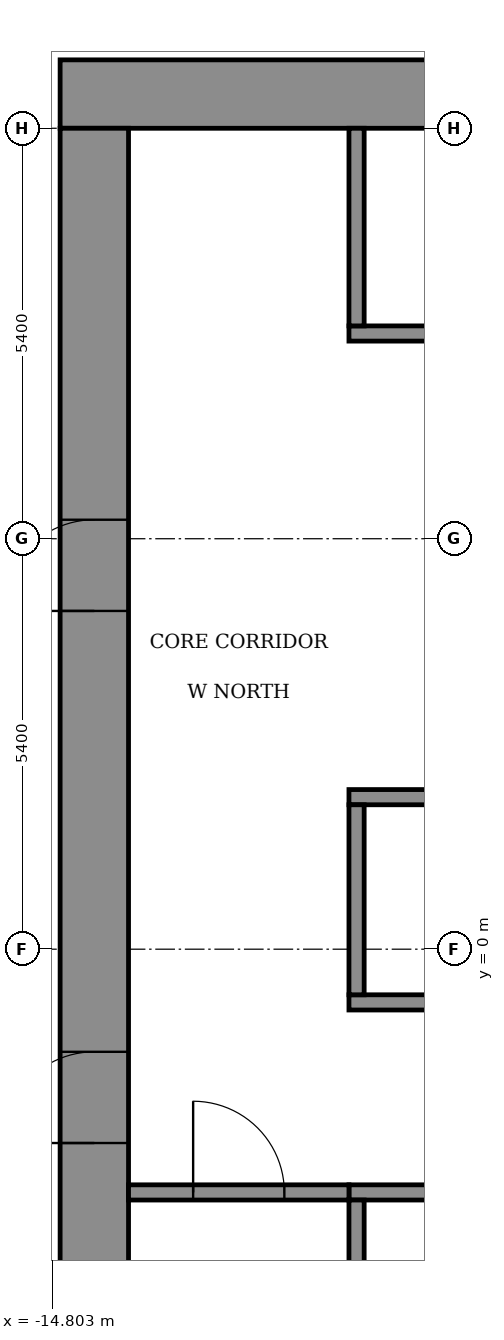
"""IFC4 building model, lengths in metres.
Left out: names, types, materials, properties, quantities, classifications, styles, units other than length and angle.
Written with IfcOpenShell. Run it as: python <this file> out.ifc"""

import sys

from ifc_helpers import new_model, si_unit, direction, frame, frame_2d, origin, place, context, subcontext, project, spatial, rectangle, extrude, element, fill, save


model = new_model("IFC4")
c1 = context("Model", 3, precision=1e-05, world=origin(), true_north=direction((0.0, 1.0)))
c2 = subcontext(c1, "Body", "Model", "MODEL_VIEW")
j1 = project(units=[si_unit("LENGTHUNIT", "METRE"), si_unit("PLANEANGLEUNIT", "RADIAN")], contexts=[c1])
p1 = place(None, origin())
s1 = spatial("IfcSite", under=j1, at=p1, CompositionType="ELEMENT")
p2 = place(p1, origin())
s2 = spatial("IfcBuilding", under=s1, at=p2, CompositionType="ELEMENT")
p3 = place(p2, frame((0.0, 0.0, 186.1)))
s3 = spatial("IfcBuildingStorey", under=s2, at=p3, CompositionType="ELEMENT", Elevation=186.1)
p4 = place(p3, frame((-14.7, 11.25, 0.0), z_axis=(0.0, 0.0, 1.0), x_axis=(1.0, 0.0, 0.0)))
e1 = element("IfcWall", 1, at=p4, inside=s3, PredefinedType="SHEAR", context=c2, shape_type="SweptSolid", body=[
    extrude(rectangle(XDim=29.4, YDim=0.9, at=frame_2d((14.7, 0.0))), origin(), (0.0, 0.0, 1.0), 3.6),
])
p5 = place(p3, frame((-14.25, -10.8, 0.0), z_axis=(0.0, 0.0, 1.0), x_axis=(0.0, 1.0, 0.0)))
e2 = element("IfcWall", 2, at=p5, inside=s3, PredefinedType="SHEAR", context=c2, shape_type="SweptSolid", body=[
    extrude(rectangle(XDim=21.6, YDim=0.9, at=frame_2d((10.8, 0.0))), origin(), (0.0, 0.0, 1.0), 3.6),
])
p6 = place(p5, frame((8.25, 0.0, 0.0)))
e3 = element("IfcOpeningElement", 3, at=p6, cuts=e2, PredefinedType="OPENING", context=c2, shape_type="SweptSolid", body=[
    extrude(rectangle(XDim=1.2, YDim=2.1, at=frame_2d((0.6, 1.05))), frame((0.0, 0.46, 0.0), z_axis=(0.0, -1.0, 0.0), x_axis=(1.0, 0.0, 0.0)), (0.0, 0.0, 1.0), 0.92),
])
p7 = place(p5, frame((15.25, 0.0, 0.0)))
e4 = element("IfcOpeningElement", 4, at=p7, cuts=e2, PredefinedType="OPENING", context=c2, shape_type="SweptSolid", body=[
    extrude(rectangle(XDim=1.2, YDim=2.1, at=frame_2d((0.6, 1.05))), frame((0.0, 0.46, 0.0), z_axis=(0.0, -1.0, 0.0), x_axis=(1.0, 0.0, 0.0)), (0.0, 0.0, 1.0), 0.92),
])
p8 = place(p3, frame((-10.9, -3.2, 0.0), z_axis=(0.0, 0.0, 1.0), x_axis=(1.0, 0.0, 0.0)))
e5 = element("IfcWall", 5, at=p8, inside=s3, PredefinedType="SHEAR", context=c2, shape_type="SweptSolid", body=[
    extrude(rectangle(XDim=21.8, YDim=0.2, at=frame_2d((10.9, 0.0))), origin(), (0.0, 0.0, 1.0), 3.05),
])
p9 = place(p8, frame((1.075, 0.0, 0.0)))
e6 = element("IfcOpeningElement", 6, at=p9, cuts=e5, PredefinedType="OPENING", context=c2, shape_type="SweptSolid", body=[
    extrude(rectangle(XDim=1.1, YDim=2.1, at=frame_2d((0.55, 1.05))), frame((0.0, 0.11, 0.0), z_axis=(0.0, -1.0, 0.0), x_axis=(1.0, 0.0, 0.0)), (0.0, 0.0, 1.0), 0.22),
])
p10 = place(p8, frame((10.325, 0.0, 0.0)))
e7 = element("IfcOpeningElement", 7, at=p10, cuts=e5, PredefinedType="OPENING", context=c2, shape_type="SweptSolid", body=[
    extrude(rectangle(XDim=1.1, YDim=2.1, at=frame_2d((0.55, 1.05))), frame((0.0, 0.11, 0.0), z_axis=(0.0, -1.0, 0.0), x_axis=(1.0, 0.0, 0.0)), (0.0, 0.0, 1.0), 0.22),
])
p11 = place(p8, frame((19.625, 0.0, 0.0)))
e8 = element("IfcOpeningElement", 8, at=p11, cuts=e5, PredefinedType="OPENING", context=c2, shape_type="SweptSolid", body=[
    extrude(rectangle(XDim=1.1, YDim=2.1, at=frame_2d((0.55, 1.05))), frame((0.0, 0.11, 0.0), z_axis=(0.0, -1.0, 0.0), x_axis=(1.0, 0.0, 0.0)), (0.0, 0.0, 1.0), 0.22),
])
p12 = place(p8, frame((5.7, 0.0, 0.0)))
e9 = element("IfcOpeningElement", 9, at=p12, cuts=e5, PredefinedType="OPENING", context=c2, shape_type="SweptSolid", body=[
    extrude(rectangle(XDim=1.1, YDim=2.1, at=frame_2d((0.55, 1.05))), frame((0.0, 0.11, 0.0), z_axis=(0.0, -1.0, 0.0), x_axis=(1.0, 0.0, 0.0)), (0.0, 0.0, 1.0), 0.22),
])
p13 = place(p8, frame((14.975, 0.0, 0.0)))
e10 = element("IfcOpeningElement", 10, at=p13, cuts=e5, PredefinedType="OPENING", context=c2, shape_type="SweptSolid", body=[
    extrude(rectangle(XDim=1.1, YDim=2.1, at=frame_2d((0.55, 1.05))), frame((0.0, 0.11, 0.0), z_axis=(0.0, -1.0, 0.0), x_axis=(1.0, 0.0, 0.0)), (0.0, 0.0, 1.0), 0.22),
])
p14 = place(p3, frame((-10.9, -0.7, 0.0), z_axis=(0.0, 0.0, 1.0), x_axis=(1.0, 0.0, 0.0)))
e11 = element("IfcWall", 11, at=p14, inside=s3, PredefinedType="SHEAR", context=c2, shape_type="SweptSolid", body=[
    extrude(rectangle(XDim=21.8, YDim=0.2, at=frame_2d((10.9, 0.0))), origin(), (0.0, 0.0, 1.0), 3.05),
])
p15 = place(p3, frame((-10.9, 2.0, 0.0), z_axis=(0.0, 0.0, 1.0), x_axis=(1.0, 0.0, 0.0)))
e12 = element("IfcWall", 12, at=p15, inside=s3, PredefinedType="SHEAR", context=c2, shape_type="SweptSolid", body=[
    extrude(rectangle(XDim=21.8, YDim=0.2, at=frame_2d((10.9, 0.0))), origin(), (0.0, 0.0, 1.0), 3.05),
])
p16 = place(p15, frame((14.4, 0.0, 0.0)))
e13 = element("IfcOpeningElement", 13, at=p16, cuts=e12, PredefinedType="OPENING", context=c2, shape_type="SweptSolid", body=[
    extrude(rectangle(XDim=1.1, YDim=2.1, at=frame_2d((0.55, 1.05))), frame((0.0, 0.11, 0.0), z_axis=(0.0, -1.0, 0.0), x_axis=(1.0, 0.0, 0.0)), (0.0, 0.0, 1.0), 0.22),
])
p17 = place(p15, frame((17.1, 0.0, 0.0)))
e14 = element("IfcOpeningElement", 14, at=p17, cuts=e12, PredefinedType="OPENING", context=c2, shape_type="SweptSolid", body=[
    extrude(rectangle(XDim=1.1, YDim=2.1, at=frame_2d((0.55, 1.05))), frame((0.0, 0.11, 0.0), z_axis=(0.0, -1.0, 0.0), x_axis=(1.0, 0.0, 0.0)), (0.0, 0.0, 1.0), 0.22),
])
p18 = place(p15, frame((19.8, 0.0, 0.0)))
e15 = element("IfcOpeningElement", 15, at=p18, cuts=e12, PredefinedType="OPENING", context=c2, shape_type="SweptSolid", body=[
    extrude(rectangle(XDim=1.1, YDim=2.1, at=frame_2d((0.55, 1.05))), frame((0.0, 0.11, 0.0), z_axis=(0.0, -1.0, 0.0), x_axis=(1.0, 0.0, 0.0)), (0.0, 0.0, 1.0), 0.22),
])
p19 = place(p15, frame((3.025, 0.0, 0.0)))
e16 = element("IfcOpeningElement", 16, at=p19, cuts=e12, PredefinedType="OPENING", context=c2, shape_type="SweptSolid", body=[
    extrude(rectangle(XDim=0.9, YDim=2.1, at=frame_2d((0.45, 1.05))), frame((0.0, 0.11, 0.0), z_axis=(0.0, -1.0, 0.0), x_axis=(1.0, 0.0, 0.0)), (0.0, 0.0, 1.0), 0.22),
])
p20 = place(p15, frame((9.775, 0.0, 0.0)))
e17 = element("IfcOpeningElement", 17, at=p20, cuts=e12, PredefinedType="OPENING", context=c2, shape_type="SweptSolid", body=[
    extrude(rectangle(XDim=0.9, YDim=2.1, at=frame_2d((0.45, 1.05))), frame((0.0, 0.11, 0.0), z_axis=(0.0, -1.0, 0.0), x_axis=(1.0, 0.0, 0.0)), (0.0, 0.0, 1.0), 0.22),
])
p21 = place(p3, frame((-10.9, 8.1, 0.0), z_axis=(0.0, 0.0, 1.0), x_axis=(1.0, 0.0, 0.0)))
e18 = element("IfcWall", 18, at=p21, inside=s3, PredefinedType="SHEAR", context=c2, shape_type="SweptSolid", body=[
    extrude(rectangle(XDim=21.8, YDim=0.2, at=frame_2d((10.9, 0.0))), origin(), (0.0, 0.0, 1.0), 3.05),
])
p22 = place(p21, frame((14.4, 0.0, 0.0)))
e19 = element("IfcOpeningElement", 19, at=p22, cuts=e18, PredefinedType="OPENING", context=c2, shape_type="SweptSolid", body=[
    extrude(rectangle(XDim=1.1, YDim=2.1, at=frame_2d((0.55, 1.05))), frame((0.0, 0.11, 0.0), z_axis=(0.0, -1.0, 0.0), x_axis=(1.0, 0.0, 0.0)), (0.0, 0.0, 1.0), 0.22),
])
p23 = place(p21, frame((17.1, 0.0, 0.0)))
e20 = element("IfcOpeningElement", 20, at=p23, cuts=e18, PredefinedType="OPENING", context=c2, shape_type="SweptSolid", body=[
    extrude(rectangle(XDim=1.1, YDim=2.1, at=frame_2d((0.55, 1.05))), frame((0.0, 0.11, 0.0), z_axis=(0.0, -1.0, 0.0), x_axis=(1.0, 0.0, 0.0)), (0.0, 0.0, 1.0), 0.22),
])
p24 = place(p21, frame((19.8, 0.0, 0.0)))
e21 = element("IfcOpeningElement", 21, at=p24, cuts=e18, PredefinedType="OPENING", context=c2, shape_type="SweptSolid", body=[
    extrude(rectangle(XDim=1.1, YDim=2.1, at=frame_2d((0.55, 1.05))), frame((0.0, 0.11, 0.0), z_axis=(0.0, -1.0, 0.0), x_axis=(1.0, 0.0, 0.0)), (0.0, 0.0, 1.0), 0.22),
])
p25 = place(p21, frame((6.4, 0.0, 0.0)))
e22 = element("IfcOpeningElement", 22, at=p25, cuts=e18, PredefinedType="OPENING", context=c2, shape_type="SweptSolid", body=[
    extrude(rectangle(XDim=0.9, YDim=2.1, at=frame_2d((0.45, 1.05))), frame((0.0, 0.11, 0.0), z_axis=(0.0, -1.0, 0.0), x_axis=(1.0, 0.0, 0.0)), (0.0, 0.0, 1.0), 0.22),
])
p26 = place(p3, frame((-10.8, -10.8, 0.0), z_axis=(0.0, 0.0, 1.0), x_axis=(0.0, 1.0, 0.0)))
e23 = element("IfcWall", 23, at=p26, inside=s3, PredefinedType="SHEAR", context=c2, shape_type="SweptSolid", body=[
    extrude(rectangle(XDim=7.5, YDim=0.2, at=frame_2d((3.75, 0.0))), origin(), (0.0, 0.0, 1.0), 3.05),
])
p27 = place(p3, frame((-10.8, -0.6, 0.0), z_axis=(0.0, 0.0, 1.0), x_axis=(0.0, 1.0, 0.0)))
e24 = element("IfcWall", 24, at=p27, inside=s3, PredefinedType="STANDARD", context=c2, shape_type="SweptSolid", body=[
    extrude(rectangle(XDim=2.5, YDim=0.2, at=frame_2d((1.25, 0.0))), origin(), (0.0, 0.0, 1.0), 3.05),
])
p28 = place(p3, frame((-10.8, 8.2, 0.0), z_axis=(0.0, 0.0, 1.0), x_axis=(0.0, 1.0, 0.0)))
e25 = element("IfcWall", 25, at=p28, inside=s3, PredefinedType="STANDARD", context=c2, shape_type="SweptSolid", body=[
    extrude(rectangle(XDim=2.6, YDim=0.2, at=frame_2d((1.3, 0.0))), origin(), (0.0, 0.0, 1.0), 3.05),
])
p29 = place(p3, frame((-13.8, -3.2, 0.0), z_axis=(0.0, 0.0, 1.0), x_axis=(1.0, 0.0, 0.0)))
e26 = element("IfcWall", 26, at=p29, inside=s3, PredefinedType="STANDARD", context=c2, shape_type="SweptSolid", body=[
    extrude(rectangle(XDim=2.9, YDim=0.2, at=frame_2d((1.45, 0.0))), origin(), (0.0, 0.0, 1.0), 3.05),
])
p30 = place(p29, frame((0.85, 0.0, 0.0)))
e27 = element("IfcOpeningElement", 27, at=p30, cuts=e26, PredefinedType="OPENING", context=c2, shape_type="SweptSolid", body=[
    extrude(rectangle(XDim=1.2, YDim=2.1, at=frame_2d((0.6, 1.05))), frame((0.0, 0.11, 0.0), z_axis=(0.0, -1.0, 0.0), x_axis=(1.0, 0.0, 0.0)), (0.0, 0.0, 1.0), 0.22),
])
p31 = place(p6, origin())
e28 = element("IfcDoor", 28, at=p31, inside=s3, OperationType="DOUBLE_DOOR_SINGLE_SWING", PredefinedType="DOOR", context=c2, shape_type="SweptSolid", body=[
    extrude(rectangle(XDim=1.2, YDim=2.1, at=frame_2d((0.6, 1.05))), frame((0.0, 0.025, 0.0), z_axis=(0.0, -1.0, 0.0), x_axis=(1.0, 0.0, 0.0)), (0.0, 0.0, 1.0), 0.05),
])
fill(e3, e28)
p32 = place(p7, origin())
e29 = element("IfcDoor", 29, at=p32, inside=s3, OperationType="DOUBLE_DOOR_SINGLE_SWING", PredefinedType="DOOR", context=c2, shape_type="SweptSolid", body=[
    extrude(rectangle(XDim=1.2, YDim=2.1, at=frame_2d((0.6, 1.05))), frame((0.0, 0.025, 0.0), z_axis=(0.0, -1.0, 0.0), x_axis=(1.0, 0.0, 0.0)), (0.0, 0.0, 1.0), 0.05),
])
fill(e4, e29)
p33 = place(p30, origin())
e30 = element("IfcDoor", 30, at=p33, inside=s3, OperationType="SINGLE_SWING_LEFT", PredefinedType="DOOR", context=c2, shape_type="SweptSolid", body=[
    extrude(rectangle(XDim=1.2, YDim=2.1, at=frame_2d((0.6, 1.05))), frame((0.0, 0.025, 0.0), z_axis=(0.0, -1.0, 0.0), x_axis=(1.0, 0.0, 0.0)), (0.0, 0.0, 1.0), 0.05),
])
fill(e27, e30)
save(model, sys.argv[1])
